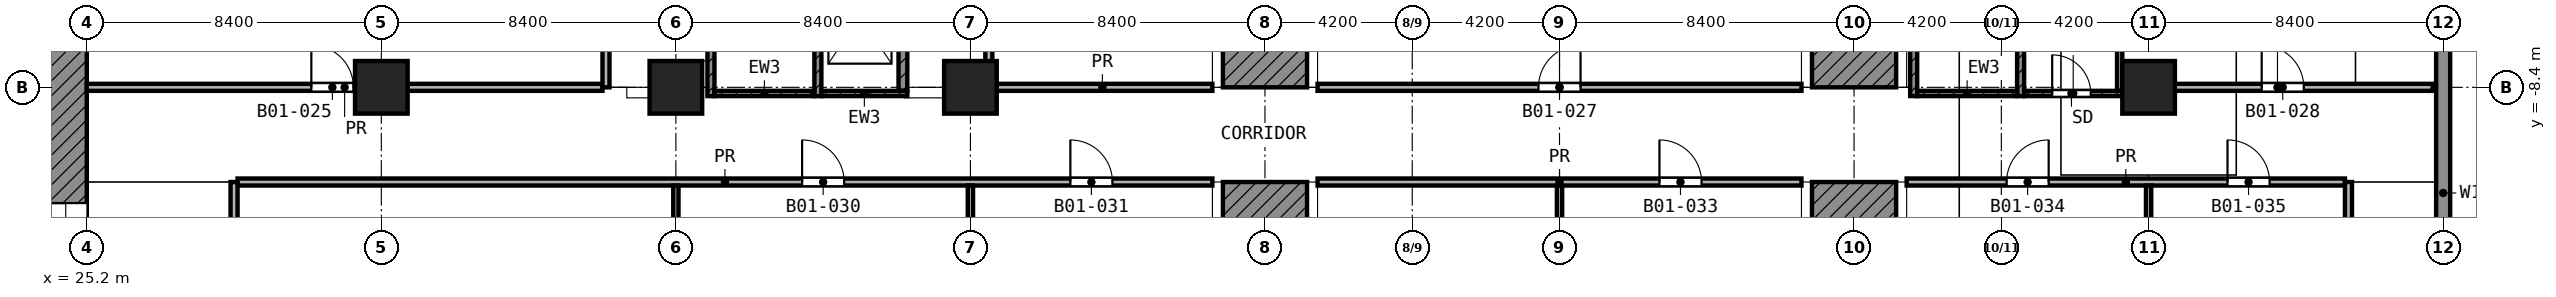
"""IFC4 building model, lengths in metres.
Left out: names, types, materials, properties, quantities, classifications, styles, units other than length and angle.
Written with IfcOpenShell. Run it as: python <this file> out.ifc"""

import sys

from ifc_helpers import new_model, si_unit, direction, frame, frame_2d, origin, origin_2d, place, context, subcontext, project, spatial, polyline, rectangle, outline, extrude, element, fill, save


model = new_model("IFC4")
c1 = context("Model", 3, precision=1e-05, world=origin(), true_north=direction((0.0, 1.0)))
c2 = subcontext(c1, "Body", "Model", "MODEL_VIEW")
j1 = project(units=[si_unit("LENGTHUNIT", "METRE"), si_unit("PLANEANGLEUNIT", "RADIAN")], contexts=[c1])
p1 = place(None, origin())
s1 = spatial("IfcSite", under=j1, at=p1, CompositionType="ELEMENT")
p2 = place(p1, origin())
s2 = spatial("IfcBuilding", under=s1, at=p2, CompositionType="ELEMENT")
p3 = place(p2, frame((0.0, 0.0, -6.0)))
s3 = spatial("IfcBuildingStorey", under=s2, at=p3, CompositionType="ELEMENT", Elevation=-6.0)
p4 = place(p3, origin())
e1 = element("IfcWall", 1, at=p4, inside=s3, PredefinedType="SOLIDWALL", context=c2, shape_type="SweptSolid", body=[
    extrude(outline(polyline([(92.2, -16.1), (92.2, -6.725), (92.6, -6.725), (92.6, -16.1), (92.2, -16.1)])), origin(), (0.0, 0.0, 1.0), 5.55),
])
for number, where, z_axis, x_axis in (
    (2, (33.6, -8.4, 0.0), (0.0, 0.0, 1.0), (1.0, 0.0, 0.0)),
    (3, (42.0, -8.4, 0.0), (0.0, 0.0, 1.0), (1.0, 0.0, 0.0)),
    (4, (50.4, -8.4, 0.0), (0.0, 0.0, 1.0), (1.0, 0.0, 0.0)),
    (5, (84.0, -8.4, 0.0), (0.0, 0.0, 1.0), (1.0, 0.0, 0.0)),
):
    element("IfcColumn", number, at=place(p3, frame(where, z_axis=z_axis, x_axis=x_axis)), inside=s3, PredefinedType="COLUMN", context=c2, shape_type="SweptSolid", body=[
        extrude(rectangle(XDim=1.5, YDim=1.5, at=origin_2d()), origin(), (0.0, 0.0, 1.0), 6.0),
    ])
p5 = place(p3, frame((0.0, 0.0, 6.0), z_axis=(0.0, -1.0, 0.0), x_axis=(1.0, 0.0, 0.0)))
e6 = element("IfcWall", 6, at=p5, inside=s3, PredefinedType="SHEAR", context=c2, shape_type="SweptSolid", body=[
    extrude(outline(polyline([(60.0, 0.0), (60.0, -6.0), (57.6, -6.0), (57.6, 0.0), (60.0, 0.0)])), origin(), (0.0, 0.0, 1.0), 8.4),
])
p6 = place(p3, frame((0.0, -11.1, 6.0), z_axis=(0.0, -1.0, 0.0), x_axis=(1.0, 0.0, 0.0)))
e7 = element("IfcWall", 7, at=p6, inside=s3, PredefinedType="SHEAR", context=c2, shape_type="SweptSolid", body=[
    extrude(outline(polyline([(60.0, 0.0), (60.0, -6.0), (57.6, -6.0), (57.6, 0.0), (60.0, 0.0)])), origin(), (0.0, 0.0, 1.0), 11.4),
])
e8 = element("IfcWall", 8, at=p5, inside=s3, PredefinedType="SHEAR", context=c2, shape_type="SweptSolid", body=[
    extrude(outline(polyline([(74.4, -6.0), (74.4, 0.0), (76.8, 0.0), (76.8, -6.0), (74.4, -6.0)])), origin(), (0.0, 0.0, 1.0), 8.4),
])
e9 = element("IfcWall", 9, at=p6, inside=s3, PredefinedType="SHEAR", context=c2, shape_type="SweptSolid", body=[
    extrude(outline(polyline([(74.4, -6.0), (74.4, 0.0), (76.8, 0.0), (76.8, -6.0), (74.4, -6.0)])), origin(), (0.0, 0.0, 1.0), 11.4),
])
p7 = place(p3, frame((24.6, -24.0, 0.0), z_axis=(0.0, 0.0, 1.0), x_axis=(0.0, 1.0, 0.0)))
e10 = element("IfcWall", 10, at=p7, inside=s3, PredefinedType="SHEAR", context=c2, shape_type="SweptSolid", body=[
    extrude(rectangle(XDim=18.6, YDim=1.2, at=frame_2d((9.3, 0.0))), origin(), (0.0, 0.0, 1.0), 5.55),
])
p8 = place(p7, frame((10.5, 0.0, 0.0)))
e11 = element("IfcOpeningElement", 11, at=p8, cuts=e10, PredefinedType="OPENING", context=c2, shape_type="SweptSolid", body=[
    extrude(rectangle(XDim=1.8, YDim=2.1, at=frame_2d((0.9, 1.05))), frame((0.0, 0.61, 0.0), z_axis=(0.0, -1.0, 0.0), x_axis=(1.0, 0.0, 0.0)), (0.0, 0.0, 1.0), 1.22),
])
p9 = place(p3, frame((43.0, -8.65, 0.0), z_axis=(0.0, 0.0, 1.0), x_axis=(0.0, 1.0, 0.0)))
e12 = element("IfcWall", 12, at=p9, inside=s3, PredefinedType="SHEAR", context=c2, shape_type="SweptSolid", body=[
    extrude(rectangle(XDim=8.35, YDim=0.2, at=frame_2d((4.175, 0.0))), origin(), (0.0, 0.0, 1.0), 5.55),
])
p10 = place(p9, frame((7.0, 0.0, 0.0)))
e13 = element("IfcOpeningElement", 13, at=p10, cuts=e12, PredefinedType="OPENING", context=c2, shape_type="SweptSolid", body=[
    extrude(rectangle(XDim=1.1, YDim=2.1, at=frame_2d((0.55, 1.05))), frame((0.0, 0.11, 0.0), z_axis=(0.0, -1.0, 0.0), x_axis=(1.0, 0.0, 0.0)), (0.0, 0.0, 1.0), 0.22),
])
p11 = place(p3, frame((46.05, -8.65, 0.0), z_axis=(0.0, 0.0, 1.0), x_axis=(0.0, 1.0, 0.0)))
e14 = element("IfcWall", 14, at=p11, inside=s3, PredefinedType="SHEAR", context=c2, shape_type="SweptSolid", body=[
    extrude(rectangle(XDim=8.35, YDim=0.2, at=frame_2d((4.175, 0.0))), origin(), (0.0, 0.0, 1.0), 5.55),
])
p12 = place(p11, frame((7.0, 0.0, 0.0)))
e15 = element("IfcOpeningElement", 15, at=p12, cuts=e14, PredefinedType="OPENING", context=c2, shape_type="SweptSolid", body=[
    extrude(rectangle(XDim=1.1, YDim=2.1, at=frame_2d((0.55, 1.05))), frame((0.0, 0.11, 0.0), z_axis=(0.0, -1.0, 0.0), x_axis=(1.0, 0.0, 0.0)), (0.0, 0.0, 1.0), 0.22),
])
p13 = place(p3, frame((43.1, -8.575, 0.0), z_axis=(0.0, 0.0, 1.0), x_axis=(1.0, 0.0, 0.0)))
e16 = element("IfcWall", 16, at=p13, inside=s3, PredefinedType="SHEAR", context=c2, shape_type="SweptSolid", body=[
    extrude(rectangle(XDim=2.85, YDim=0.15, at=frame_2d((1.425, 0.0))), origin(), (0.0, 0.0, 1.0), 5.55),
])
p14 = place(p3, frame((46.15, -8.575, 0.0), z_axis=(0.0, 0.0, 1.0), x_axis=(1.0, 0.0, 0.0)))
e17 = element("IfcWall", 17, at=p14, inside=s3, PredefinedType="SHEAR", context=c2, shape_type="SweptSolid", body=[
    extrude(rectangle(XDim=2.45, YDim=0.15, at=frame_2d((1.225, 0.0))), origin(), (0.0, 0.0, 1.0), 5.55),
])
p15 = place(p3, frame((48.475, -8.5, 0.0), z_axis=(0.0, 0.0, 1.0), x_axis=(0.0, 1.0, 0.0)))
e18 = element("IfcWall", 18, at=p15, inside=s3, PredefinedType="SHEAR", context=c2, shape_type="SweptSolid", body=[
    extrude(rectangle(XDim=3.475, YDim=0.25, at=frame_2d((1.738, 0.0))), origin(), (0.0, 0.0, 1.0), 5.55),
])
p16 = place(p3, frame((77.3, -8.65, 0.0), z_axis=(0.0, 0.0, 1.0), x_axis=(0.0, 1.0, 0.0)))
e19 = element("IfcWall", 19, at=p16, inside=s3, PredefinedType="SHEAR", context=c2, shape_type="SweptSolid", body=[
    extrude(rectangle(XDim=8.35, YDim=0.2, at=frame_2d((4.175, 0.0))), origin(), (0.0, 0.0, 1.0), 5.55),
])
p17 = place(p3, frame((80.35, -8.65, 0.0), z_axis=(0.0, 0.0, 1.0), x_axis=(0.0, 1.0, 0.0)))
e20 = element("IfcWall", 20, at=p17, inside=s3, PredefinedType="SHEAR", context=c2, shape_type="SweptSolid", body=[
    extrude(rectangle(XDim=8.35, YDim=0.2, at=frame_2d((4.175, 0.0))), origin(), (0.0, 0.0, 1.0), 5.55),
])
p18 = place(p17, frame((6.95, 0.0, 0.0)))
e21 = element("IfcOpeningElement", 21, at=p18, cuts=e20, PredefinedType="OPENING", context=c2, shape_type="SweptSolid", body=[
    extrude(rectangle(XDim=1.1, YDim=2.1, at=frame_2d((0.55, 1.05))), frame((0.0, 0.11, 0.0), z_axis=(0.0, -1.0, 0.0), x_axis=(1.0, 0.0, 0.0)), (0.0, 0.0, 1.0), 0.22),
])
p19 = place(p3, frame((77.4, -8.575, 0.0), z_axis=(0.0, 0.0, 1.0), x_axis=(1.0, 0.0, 0.0)))
e22 = element("IfcWall", 22, at=p19, inside=s3, PredefinedType="SHEAR", context=c2, shape_type="SweptSolid", body=[
    extrude(rectangle(XDim=2.85, YDim=0.15, at=frame_2d((1.425, 0.0))), origin(), (0.0, 0.0, 1.0), 5.55),
])
p20 = place(p3, frame((80.45, -8.575, 0.0), z_axis=(0.0, 0.0, 1.0), x_axis=(1.0, 0.0, 0.0)))
e23 = element("IfcWall", 23, at=p20, inside=s3, PredefinedType="SHEAR", context=c2, shape_type="SweptSolid", body=[
    extrude(rectangle(XDim=2.8, YDim=0.15, at=frame_2d((1.4, 0.0))), origin(), (0.0, 0.0, 1.0), 5.55),
])
p21 = place(p20, frame((0.8, 0.0, 0.0)))
e24 = element("IfcOpeningElement", 24, at=p21, cuts=e23, PredefinedType="OPENING", context=c2, shape_type="SweptSolid", body=[
    extrude(rectangle(XDim=1.1, YDim=2.1, at=frame_2d((0.55, 1.05))), frame((0.0, 0.085, 0.0), z_axis=(0.0, -1.0, 0.0), x_axis=(1.0, 0.0, 0.0)), (0.0, 0.0, 1.0), 0.17),
])
p22 = place(p3, frame((83.175, -8.5, 0.0), z_axis=(0.0, 0.0, 1.0), x_axis=(0.0, 1.0, 0.0)))
e25 = element("IfcWall", 25, at=p22, inside=s3, PredefinedType="PARTITIONING", context=c2, shape_type="SweptSolid", body=[
    extrude(rectangle(XDim=8.05, YDim=0.15, at=frame_2d((4.025, 0.0))), origin(), (0.0, 0.0, 1.0), 5.55),
])
for number, where, z_axis, x_axis in (
    (26, (42.0, -22.4, 0.0), (0.0, 0.0, 1.0), (0.0, 1.0, 0.0)),
    (27, (50.4, -22.4, 0.0), (0.0, 0.0, 1.0), (0.0, 1.0, 0.0)),
    (28, (67.2, -22.4, 0.0), (0.0, 0.0, 1.0), (0.0, 1.0, 0.0)),
    (29, (84.0, -22.4, 0.0), (0.0, 0.0, 1.0), (0.0, 1.0, 0.0)),
):
    element("IfcWall", number, at=place(p3, frame(where, z_axis=z_axis, x_axis=x_axis)), inside=s3, PredefinedType="PARTITIONING", context=c2, shape_type="SweptSolid", body=[
        extrude(rectangle(XDim=11.2, YDim=0.15, at=frame_2d((5.6, 0.0))), origin(), (0.0, 0.0, 1.0), 5.55),
    ])
p23 = place(p3, frame((29.5, -11.1, 0.0), z_axis=(0.0, 0.0, 1.0), x_axis=(1.0, 0.0, 0.0)))
e30 = element("IfcWall", 30, at=p23, inside=s3, PredefinedType="PARTITIONING", context=c2, shape_type="SweptSolid", body=[
    extrude(rectangle(XDim=27.8, YDim=0.2, at=frame_2d((13.9, 0.0))), origin(), (0.0, 0.0, 1.0), 5.55),
])
p24 = place(p23, frame((16.1, 0.0, 0.0)))
e31 = element("IfcOpeningElement", 31, at=p24, cuts=e30, PredefinedType="OPENING", context=c2, shape_type="SweptSolid", body=[
    extrude(rectangle(XDim=1.2, YDim=2.1, at=frame_2d((0.6, 1.05))), frame((0.0, 0.11, 0.0), z_axis=(0.0, -1.0, 0.0), x_axis=(1.0, 0.0, 0.0)), (0.0, 0.0, 1.0), 0.22),
])
p25 = place(p23, frame((23.75, 0.0, 0.0)))
e32 = element("IfcOpeningElement", 32, at=p25, cuts=e30, PredefinedType="OPENING", context=c2, shape_type="SweptSolid", body=[
    extrude(rectangle(XDim=1.2, YDim=2.1, at=frame_2d((0.6, 1.05))), frame((0.0, 0.11, 0.0), z_axis=(0.0, -1.0, 0.0), x_axis=(1.0, 0.0, 0.0)), (0.0, 0.0, 1.0), 0.22),
])
p26 = place(p3, frame((60.3, -11.1, 0.0), z_axis=(0.0, 0.0, 1.0), x_axis=(1.0, 0.0, 0.0)))
e33 = element("IfcWall", 33, at=p26, inside=s3, PredefinedType="PARTITIONING", context=c2, shape_type="SweptSolid", body=[
    extrude(rectangle(XDim=13.8, YDim=0.2, at=frame_2d((6.9, 0.0))), origin(), (0.0, 0.0, 1.0), 5.55),
])
p27 = place(p26, frame((9.75, 0.0, 0.0)))
e34 = element("IfcOpeningElement", 34, at=p27, cuts=e33, PredefinedType="OPENING", context=c2, shape_type="SweptSolid", body=[
    extrude(rectangle(XDim=1.2, YDim=2.1, at=frame_2d((0.6, 1.05))), frame((0.0, 0.11, 0.0), z_axis=(0.0, -1.0, 0.0), x_axis=(1.0, 0.0, 0.0)), (0.0, 0.0, 1.0), 0.22),
])
p28 = place(p3, frame((77.1, -11.1, 0.0), z_axis=(0.0, 0.0, 1.0), x_axis=(1.0, 0.0, 0.0)))
e35 = element("IfcWall", 35, at=p28, inside=s3, PredefinedType="PARTITIONING", context=c2, shape_type="SweptSolid", body=[
    extrude(rectangle(XDim=12.5, YDim=0.2, at=frame_2d((6.25, 0.0))), origin(), (0.0, 0.0, 1.0), 5.55),
])
p29 = place(p28, frame((2.85, 0.0, 0.0)))
e36 = element("IfcOpeningElement", 36, at=p29, cuts=e35, PredefinedType="OPENING", context=c2, shape_type="SweptSolid", body=[
    extrude(rectangle(XDim=1.2, YDim=2.1, at=frame_2d((0.6, 1.05))), frame((0.0, 0.11, 0.0), z_axis=(0.0, -1.0, 0.0), x_axis=(1.0, 0.0, 0.0)), (0.0, 0.0, 1.0), 0.22),
])
p30 = place(p28, frame((9.15, 0.0, 0.0)))
e37 = element("IfcOpeningElement", 37, at=p30, cuts=e35, PredefinedType="OPENING", context=c2, shape_type="SweptSolid", body=[
    extrude(rectangle(XDim=1.2, YDim=2.1, at=frame_2d((0.6, 1.05))), frame((0.0, 0.11, 0.0), z_axis=(0.0, -1.0, 0.0), x_axis=(1.0, 0.0, 0.0)), (0.0, 0.0, 1.0), 0.22),
])
p31 = place(p3, frame((25.2, -8.4, 0.0), z_axis=(0.0, 0.0, 1.0), x_axis=(1.0, 0.0, 0.0)))
e38 = element("IfcWall", 38, at=p31, inside=s3, PredefinedType="PARTITIONING", context=c2, shape_type="SweptSolid", body=[
    extrude(rectangle(XDim=14.707, YDim=0.2, at=frame_2d((7.354, 0.0))), origin(), (0.0, 0.0, 1.0), 5.55),
])
p32 = place(p31, frame((6.404, 0.0, 0.0)))
e39 = element("IfcOpeningElement", 39, at=p32, cuts=e38, PredefinedType="OPENING", context=c2, shape_type="SweptSolid", body=[
    extrude(rectangle(XDim=1.2, YDim=2.1, at=frame_2d((0.6, 1.05))), frame((0.0, 0.11, 0.0), z_axis=(0.0, -1.0, 0.0), x_axis=(1.0, 0.0, 0.0)), (0.0, 0.0, 1.0), 0.22),
])
p33 = place(p3, frame((51.025, -8.4, 0.0), z_axis=(0.0, 0.0, 1.0), x_axis=(1.0, 0.0, 0.0)))
e40 = element("IfcWall", 40, at=p33, inside=s3, PredefinedType="PARTITIONING", context=c2, shape_type="SweptSolid", body=[
    extrude(rectangle(XDim=6.275, YDim=0.2, at=frame_2d((3.138, 0.0))), origin(), (0.0, 0.0, 1.0), 5.55),
])
p34 = place(p3, frame((60.3, -8.4, 0.0), z_axis=(0.0, 0.0, 1.0), x_axis=(1.0, 0.0, 0.0)))
e41 = element("IfcWall", 41, at=p34, inside=s3, PredefinedType="PARTITIONING", context=c2, shape_type="SweptSolid", body=[
    extrude(rectangle(XDim=13.8, YDim=0.2, at=frame_2d((6.9, 0.0))), origin(), (0.0, 0.0, 1.0), 5.55),
])
p35 = place(p34, frame((6.3, 0.0, 0.0)))
e42 = element("IfcOpeningElement", 42, at=p35, cuts=e41, PredefinedType="OPENING", context=c2, shape_type="SweptSolid", body=[
    extrude(rectangle(XDim=1.2, YDim=2.1, at=frame_2d((0.6, 1.05))), frame((0.0, 0.11, 0.0), z_axis=(0.0, -1.0, 0.0), x_axis=(1.0, 0.0, 0.0)), (0.0, 0.0, 1.0), 0.22),
])
p36 = place(p3, frame((83.25, -8.4, 0.0), z_axis=(0.0, 0.0, 1.0), x_axis=(1.0, 0.0, 0.0)))
e43 = element("IfcWall", 43, at=p36, inside=s3, PredefinedType="PARTITIONING", context=c2, shape_type="SweptSolid", body=[
    extrude(rectangle(XDim=8.851, YDim=0.2, at=frame_2d((4.426, 0.0))), origin(), (0.0, 0.0, 1.0), 5.55),
])
p37 = place(p36, frame((3.975, 0.0, 0.0)))
e44 = element("IfcOpeningElement", 44, at=p37, cuts=e43, PredefinedType="OPENING", context=c2, shape_type="SweptSolid", body=[
    extrude(rectangle(XDim=1.2, YDim=2.1, at=frame_2d((0.6, 1.05))), frame((0.0, 0.11, 0.0), z_axis=(0.0, -1.0, 0.0), x_axis=(1.0, 0.0, 0.0)), (0.0, 0.0, 1.0), 0.22),
])
p38 = place(p3, frame((29.4, -14.1, 0.0), z_axis=(0.0, 0.0, 1.0), x_axis=(0.0, 1.0, 0.0)))
e45 = element("IfcWall", 45, at=p38, inside=s3, PredefinedType="PARTITIONING", context=c2, shape_type="SweptSolid", body=[
    extrude(rectangle(XDim=3.0, YDim=0.2, at=frame_2d((1.5, 0.0))), origin(), (0.0, 0.0, 1.0), 5.55),
])
p39 = place(p3, frame((40.007, -8.4, 0.0), z_axis=(0.0, 0.0, 1.0), x_axis=(0.0, 1.0, 0.0)))
e46 = element("IfcWall", 46, at=p39, inside=s3, PredefinedType="PARTITIONING", context=c2, shape_type="SweptSolid", body=[
    extrude(rectangle(XDim=8.101, YDim=0.2, at=frame_2d((4.05, 0.0))), origin(), (0.0, 0.0, 1.0), 5.55),
])
p40 = place(p3, frame((50.925, -8.4, 0.0), z_axis=(0.0, 0.0, 1.0), x_axis=(0.0, 1.0, 0.0)))
e47 = element("IfcWall", 47, at=p40, inside=s3, PredefinedType="PARTITIONING", context=c2, shape_type="SweptSolid", body=[
    extrude(rectangle(XDim=6.549, YDim=0.2, at=frame_2d((3.274, 0.0))), origin(), (0.0, 0.0, 1.0), 5.55),
])
p41 = place(p40, frame((2.675, 0.0, 0.0)))
e48 = element("IfcOpeningElement", 48, at=p41, cuts=e47, PredefinedType="OPENING", context=c2, shape_type="SweptSolid", body=[
    extrude(rectangle(XDim=1.2, YDim=2.1, at=frame_2d((0.6, 1.05))), frame((0.0, 0.11, 0.0), z_axis=(0.0, -1.0, 0.0), x_axis=(1.0, 0.0, 0.0)), (0.0, 0.0, 1.0), 0.22),
])
p42 = place(p3, frame((89.7, -22.5, 0.0), z_axis=(0.0, 0.0, 1.0), x_axis=(0.0, 1.0, 0.0)))
e49 = element("IfcWall", 49, at=p42, inside=s3, PredefinedType="PARTITIONING", context=c2, shape_type="SweptSolid", body=[
    extrude(rectangle(XDim=11.4, YDim=0.2, at=frame_2d((5.7, 0.0))), origin(), (0.0, 0.0, 1.0), 5.55),
])
p43 = place(p8, origin())
e50 = element("IfcDoor", 50, at=p43, inside=s3, OperationType="DOUBLE_DOOR_SINGLE_SWING", PredefinedType="DOOR", context=c2, shape_type="SweptSolid", body=[
    extrude(rectangle(XDim=1.8, YDim=2.1, at=frame_2d((0.9, 1.05))), frame((0.0, 0.025, 0.0), z_axis=(0.0, -1.0, 0.0), x_axis=(1.0, 0.0, 0.0)), (0.0, 0.0, 1.0), 0.05),
])
fill(e11, e50)
p44 = place(p21, origin())
e51 = element("IfcDoor", 51, at=p44, inside=s3, OperationType="SINGLE_SWING_LEFT", PredefinedType="DOOR", context=c2, shape_type="SweptSolid", body=[
    extrude(rectangle(XDim=1.1, YDim=2.1, at=frame_2d((0.55, 1.05))), frame((0.0, 0.025, 0.0), z_axis=(0.0, -1.0, 0.0), x_axis=(1.0, 0.0, 0.0)), (0.0, 0.0, 1.0), 0.05),
])
fill(e24, e51)
p45 = place(p32, origin())
e52 = element("IfcDoor", 52, at=p45, inside=s3, OperationType="SINGLE_SWING_LEFT", PredefinedType="DOOR", context=c2, shape_type="SweptSolid", body=[
    extrude(rectangle(XDim=1.2, YDim=2.1, at=frame_2d((0.6, 1.05))), frame((0.0, 0.025, 0.0), z_axis=(0.0, -1.0, 0.0), x_axis=(1.0, 0.0, 0.0)), (0.0, 0.0, 1.0), 0.05),
])
fill(e39, e52)
p46 = place(p35, origin())
e53 = element("IfcDoor", 53, at=p46, inside=s3, OperationType="SINGLE_SWING_RIGHT", PredefinedType="DOOR", context=c2, shape_type="SweptSolid", body=[
    extrude(rectangle(XDim=1.2, YDim=2.1, at=frame_2d((0.6, 1.05))), frame((0.0, 0.025, 0.0), z_axis=(0.0, -1.0, 0.0), x_axis=(1.0, 0.0, 0.0)), (0.0, 0.0, 1.0), 0.05),
])
fill(e42, e53)
p47 = place(p37, origin())
e54 = element("IfcDoor", 54, at=p47, inside=s3, OperationType="SINGLE_SWING_LEFT", PredefinedType="DOOR", context=c2, shape_type="SweptSolid", body=[
    extrude(rectangle(XDim=1.2, YDim=2.1, at=frame_2d((0.6, 1.05))), frame((0.0, 0.025, 0.0), z_axis=(0.0, -1.0, 0.0), x_axis=(1.0, 0.0, 0.0)), (0.0, 0.0, 1.0), 0.05),
])
fill(e44, e54)
p48 = place(p24, origin())
e55 = element("IfcDoor", 55, at=p48, inside=s3, OperationType="SINGLE_SWING_LEFT", PredefinedType="DOOR", context=c2, shape_type="SweptSolid", body=[
    extrude(rectangle(XDim=1.2, YDim=2.1, at=frame_2d((0.6, 1.05))), frame((0.0, 0.025, 0.0), z_axis=(0.0, -1.0, 0.0), x_axis=(1.0, 0.0, 0.0)), (0.0, 0.0, 1.0), 0.05),
])
fill(e31, e55)
p49 = place(p25, origin())
e56 = element("IfcDoor", 56, at=p49, inside=s3, OperationType="SINGLE_SWING_LEFT", PredefinedType="DOOR", context=c2, shape_type="SweptSolid", body=[
    extrude(rectangle(XDim=1.2, YDim=2.1, at=frame_2d((0.6, 1.05))), frame((0.0, 0.025, 0.0), z_axis=(0.0, -1.0, 0.0), x_axis=(1.0, 0.0, 0.0)), (0.0, 0.0, 1.0), 0.05),
])
fill(e32, e56)
p50 = place(p27, origin())
e57 = element("IfcDoor", 57, at=p50, inside=s3, OperationType="SINGLE_SWING_LEFT", PredefinedType="DOOR", context=c2, shape_type="SweptSolid", body=[
    extrude(rectangle(XDim=1.2, YDim=2.1, at=frame_2d((0.6, 1.05))), frame((0.0, 0.025, 0.0), z_axis=(0.0, -1.0, 0.0), x_axis=(1.0, 0.0, 0.0)), (0.0, 0.0, 1.0), 0.05),
])
fill(e34, e57)
p51 = place(p29, origin())
e58 = element("IfcDoor", 58, at=p51, inside=s3, OperationType="SINGLE_SWING_RIGHT", PredefinedType="DOOR", context=c2, shape_type="SweptSolid", body=[
    extrude(rectangle(XDim=1.2, YDim=2.1, at=frame_2d((0.6, 1.05))), frame((0.0, 0.025, 0.0), z_axis=(0.0, -1.0, 0.0), x_axis=(1.0, 0.0, 0.0)), (0.0, 0.0, 1.0), 0.05),
])
fill(e36, e58)
p52 = place(p30, origin())
e59 = element("IfcDoor", 59, at=p52, inside=s3, OperationType="SINGLE_SWING_LEFT", PredefinedType="DOOR", context=c2, shape_type="SweptSolid", body=[
    extrude(rectangle(XDim=1.2, YDim=2.1, at=frame_2d((0.6, 1.05))), frame((0.0, 0.025, 0.0), z_axis=(0.0, -1.0, 0.0), x_axis=(1.0, 0.0, 0.0)), (0.0, 0.0, 1.0), 0.05),
])
fill(e37, e59)
save(model, sys.argv[1])
